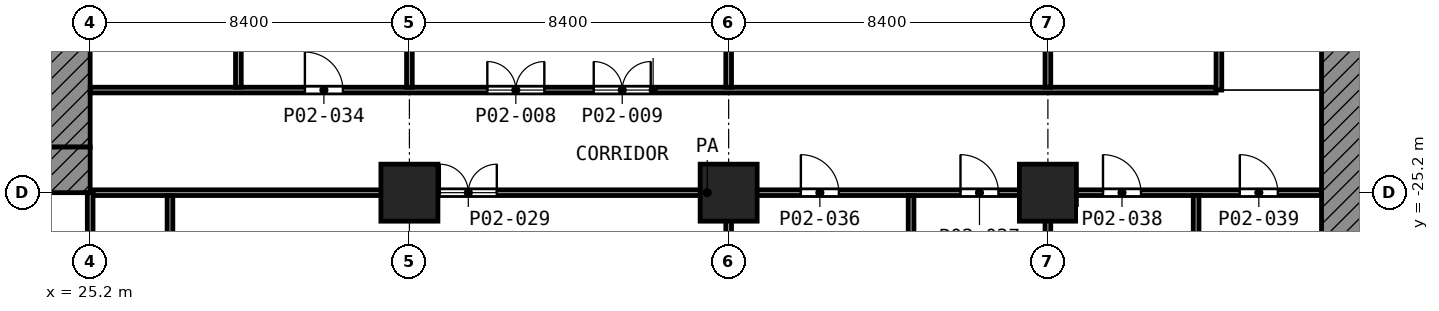
"""IFC4 building model, lengths in metres.
Left out: names, types, materials, properties, quantities, classifications, styles, units other than length and angle.
Written with IfcOpenShell. Run it as: python <this file> out.ifc"""

import sys

from ifc_helpers import new_model, si_unit, direction, frame, frame_2d, origin, origin_2d, place, context, subcontext, project, spatial, polyline, rectangle, outline, extrude, element, fill, save


model = new_model("IFC4")
c1 = context("Model", 3, precision=1e-05, world=origin(), true_north=direction((0.0, 1.0)))
c2 = subcontext(c1, "Body", "Model", "MODEL_VIEW")
j1 = project(units=[si_unit("LENGTHUNIT", "METRE"), si_unit("PLANEANGLEUNIT", "RADIAN")], contexts=[c1])
p1 = place(None, origin())
s1 = spatial("IfcSite", under=j1, at=p1, CompositionType="ELEMENT")
p2 = place(p1, origin())
s2 = spatial("IfcBuilding", under=s1, at=p2, CompositionType="ELEMENT")
p3 = place(p2, frame((0.0, 0.0, 7.0)))
s3 = spatial("IfcBuildingStorey", under=s2, at=p3, CompositionType="ELEMENT", Elevation=7.0)
for number, where, z_axis, x_axis in (
    (1, (33.6, -25.2, 0.0), (0.0, 0.0, 1.0), (1.0, 0.0, 0.0)),
    (2, (42.0, -25.2, 0.0), (0.0, 0.0, 1.0), (1.0, 0.0, 0.0)),
    (3, (50.4, -25.2, 0.0), (0.0, 0.0, 1.0), (1.0, 0.0, 0.0)),
):
    element("IfcColumn", number, at=place(p3, frame(where, z_axis=z_axis, x_axis=x_axis)), inside=s3, PredefinedType="COLUMN", context=c2, shape_type="SweptSolid", body=[
        extrude(rectangle(XDim=1.5, YDim=1.5, at=origin_2d()), origin(), (0.0, 0.0, 1.0), 5.6),
    ])
p4 = place(p3, frame((0.0, 0.0, -7.0), z_axis=(0.0, -1.0, 0.0), x_axis=(1.0, 0.0, 0.0)))
e4 = element("IfcWall", 4, at=p4, inside=s3, PredefinedType="SHEAR", context=c2, shape_type="SweptSolid", body=[
    extrude(outline(polyline([(60.448, 12.6), (60.159, 11.256), (60.0, 9.0), (60.0, 7.0), (57.6, 7.0), (57.6, 12.6), (60.448, 12.6)])), origin(), (0.0, 0.0, 1.0), 33.6),
])
p5 = place(p3, frame((24.6, -24.0, 0.0), z_axis=(0.0, 0.0, 1.0), x_axis=(0.0, 1.0, 0.0)))
e5 = element("IfcWall", 5, at=p5, inside=s3, PredefinedType="SHEAR", context=c2, shape_type="SweptSolid", body=[
    extrude(rectangle(XDim=18.6, YDim=1.2, at=frame_2d((9.3, 0.0))), origin(), (0.0, 0.0, 1.0), 5.25),
])
p6 = place(p5, frame((10.5, 0.0, 0.0)))
e6 = element("IfcOpeningElement", 6, at=p6, cuts=e5, PredefinedType="OPENING", context=c2, shape_type="SweptSolid", body=[
    extrude(rectangle(XDim=1.8, YDim=2.1, at=frame_2d((0.9, 1.05))), frame((0.0, 0.61, 0.0), z_axis=(0.0, -1.0, 0.0), x_axis=(1.0, 0.0, 0.0)), (0.0, 0.0, 1.0), 1.22),
])
p7 = place(p3, frame((24.6, -25.2, 0.0), z_axis=(0.0, 0.0, 1.0), x_axis=(0.0, 1.0, 0.0)))
e7 = element("IfcWall", 7, at=p7, inside=s3, PredefinedType="SHEAR", context=c2, shape_type="SweptSolid", body=[
    extrude(rectangle(XDim=1.2, YDim=1.2, at=frame_2d((0.6, 0.0))), origin(), (0.0, 0.0, 1.0), 5.25),
])
p8 = place(p3, frame((25.275, -25.2, 0.0), z_axis=(0.0, 0.0, 1.0), x_axis=(1.0, 0.0, 0.0)))
e8 = element("IfcWall", 8, at=p8, inside=s3, PredefinedType="PARTITIONING", context=c2, shape_type="SweptSolid", body=[
    extrude(rectangle(XDim=32.325, YDim=0.15, at=frame_2d((16.163, 0.0))), origin(), (0.0, 0.0, 1.0), 5.25),
])
p9 = place(p8, frame((18.625, 0.0, 0.0)))
e9 = element("IfcOpeningElement", 9, at=p9, cuts=e8, PredefinedType="OPENING", context=c2, shape_type="SweptSolid", body=[
    extrude(rectangle(XDim=1.0, YDim=2.1, at=frame_2d((0.5, 1.05))), frame((0.0, 0.085, 0.0), z_axis=(0.0, -1.0, 0.0), x_axis=(1.0, 0.0, 0.0)), (0.0, 0.0, 1.0), 0.17),
])
p10 = place(p8, frame((22.825, 0.0, 0.0)))
e10 = element("IfcOpeningElement", 10, at=p10, cuts=e8, PredefinedType="OPENING", context=c2, shape_type="SweptSolid", body=[
    extrude(rectangle(XDim=1.0, YDim=2.1, at=frame_2d((0.5, 1.05))), frame((0.0, 0.085, 0.0), z_axis=(0.0, -1.0, 0.0), x_axis=(1.0, 0.0, 0.0)), (0.0, 0.0, 1.0), 0.17),
])
p11 = place(p8, frame((26.575, 0.0, 0.0)))
e11 = element("IfcOpeningElement", 11, at=p11, cuts=e8, PredefinedType="OPENING", context=c2, shape_type="SweptSolid", body=[
    extrude(rectangle(XDim=1.0, YDim=2.1, at=frame_2d((0.5, 1.05))), frame((0.0, 0.085, 0.0), z_axis=(0.0, -1.0, 0.0), x_axis=(1.0, 0.0, 0.0)), (0.0, 0.0, 1.0), 0.17),
])
p12 = place(p8, frame((30.175, 0.0, 0.0)))
e12 = element("IfcOpeningElement", 12, at=p12, cuts=e8, PredefinedType="OPENING", context=c2, shape_type="SweptSolid", body=[
    extrude(rectangle(XDim=1.0, YDim=2.1, at=frame_2d((0.5, 1.05))), frame((0.0, 0.085, 0.0), z_axis=(0.0, -1.0, 0.0), x_axis=(1.0, 0.0, 0.0)), (0.0, 0.0, 1.0), 0.17),
])
p13 = place(p8, frame((9.125, 0.0, 0.0)))
e13 = element("IfcOpeningElement", 13, at=p13, cuts=e8, PredefinedType="OPENING", context=c2, shape_type="SweptSolid", body=[
    extrude(rectangle(XDim=1.5, YDim=2.1, at=frame_2d((0.75, 1.05))), frame((0.0, 0.085, 0.0), z_axis=(0.0, -1.0, 0.0), x_axis=(1.0, 0.0, 0.0)), (0.0, 0.0, 1.0), 0.17),
])
p14 = place(p3, frame((25.2, -22.5, 0.0), z_axis=(0.0, 0.0, 1.0), x_axis=(1.0, 0.0, 0.0)))
e14 = element("IfcWall", 14, at=p14, inside=s3, PredefinedType="PARTITIONING", context=c2, shape_type="SweptSolid", body=[
    extrude(rectangle(XDim=29.625, YDim=0.15, at=frame_2d((14.812, 0.0))), origin(), (0.0, 0.0, 1.0), 5.25),
])
p15 = place(p14, frame((5.65, 0.0, 0.0)))
e15 = element("IfcOpeningElement", 15, at=p15, cuts=e14, PredefinedType="OPENING", context=c2, shape_type="SweptSolid", body=[
    extrude(rectangle(XDim=1.0, YDim=2.1, at=frame_2d((0.5, 1.05))), frame((0.0, 0.085, 0.0), z_axis=(0.0, -1.0, 0.0), x_axis=(1.0, 0.0, 0.0)), (0.0, 0.0, 1.0), 0.17),
])
p16 = place(p14, frame((10.45, 0.0, 0.0)))
e16 = element("IfcOpeningElement", 16, at=p16, cuts=e14, PredefinedType="OPENING", context=c2, shape_type="SweptSolid", body=[
    extrude(rectangle(XDim=1.5, YDim=2.1, at=frame_2d((0.75, 1.05))), frame((0.0, 0.085, 0.0), z_axis=(0.0, -1.0, 0.0), x_axis=(1.0, 0.0, 0.0)), (0.0, 0.0, 1.0), 0.17),
])
p17 = place(p14, frame((13.25, 0.0, 0.0)))
e17 = element("IfcOpeningElement", 17, at=p17, cuts=e14, PredefinedType="OPENING", context=c2, shape_type="SweptSolid", body=[
    extrude(rectangle(XDim=1.5, YDim=2.1, at=frame_2d((0.75, 1.05))), frame((0.0, 0.085, 0.0), z_axis=(0.0, -1.0, 0.0), x_axis=(1.0, 0.0, 0.0)), (0.0, 0.0, 1.0), 0.17),
])
p18 = place(p3, frame((25.2, -32.85, 0.0), z_axis=(0.0, 0.0, 1.0), x_axis=(0.0, 1.0, 0.0)))
e18 = element("IfcWall", 18, at=p18, inside=s3, PredefinedType="PARTITIONING", context=c2, shape_type="SweptSolid", body=[
    extrude(rectangle(XDim=7.65, YDim=0.15, at=frame_2d((3.825, 0.0))), origin(), (0.0, 0.0, 1.0), 5.25),
])
p19 = place(p18, frame((3.375, 0.0, 0.0)))
e19 = element("IfcOpeningElement", 19, at=p19, cuts=e18, PredefinedType="OPENING", context=c2, shape_type="SweptSolid", body=[
    extrude(rectangle(XDim=0.9, YDim=2.1, at=frame_2d((0.45, 1.05))), frame((0.0, 0.085, 0.0), z_axis=(0.0, -1.0, 0.0), x_axis=(1.0, 0.0, 0.0)), (0.0, 0.0, 1.0), 0.17),
])
p20 = place(p3, frame((27.3, -39.525, 0.0), z_axis=(0.0, 0.0, 1.0), x_axis=(0.0, 1.0, 0.0)))
e20 = element("IfcWall", 20, at=p20, inside=s3, PredefinedType="PARTITIONING", context=c2, shape_type="SweptSolid", body=[
    extrude(rectangle(XDim=14.25, YDim=0.15, at=frame_2d((7.125, 0.0))), origin(), (0.0, 0.0, 1.0), 5.25),
])
p21 = place(p3, frame((29.1, -22.425, 0.0), z_axis=(0.0, 0.0, 1.0), x_axis=(0.0, 1.0, 0.0)))
e21 = element("IfcWall", 21, at=p21, inside=s3, PredefinedType="PARTITIONING", context=c2, shape_type="SweptSolid", body=[
    extrude(rectangle(XDim=8.25, YDim=0.15, at=frame_2d((4.125, 0.0))), origin(), (0.0, 0.0, 1.0), 5.25),
])
p22 = place(p3, frame((33.6, -22.425, 0.0), z_axis=(0.0, 0.0, 1.0), x_axis=(0.0, 1.0, 0.0)))
e22 = element("IfcWall", 22, at=p22, inside=s3, PredefinedType="PARTITIONING", context=c2, shape_type="SweptSolid", body=[
    extrude(rectangle(XDim=11.25, YDim=0.15, at=frame_2d((5.625, 0.0))), origin(), (0.0, 0.0, 1.0), 5.25),
])
p23 = place(p3, frame((42.0, -34.08, 0.0), z_axis=(0.0, 0.0, 1.0), x_axis=(0.0, 1.0, 0.0)))
e23 = element("IfcWall", 23, at=p23, inside=s3, PredefinedType="PARTITIONING", context=c2, shape_type="SweptSolid", body=[
    extrude(rectangle(XDim=8.805, YDim=0.15, at=frame_2d((4.403, 0.0))), origin(), (0.0, 0.0, 1.0), 3.85),
])
p24 = place(p3, frame((42.0, -22.425, 0.0), z_axis=(0.0, 0.0, 1.0), x_axis=(0.0, 1.0, 0.0)))
e24 = element("IfcWall", 24, at=p24, inside=s3, PredefinedType="PARTITIONING", context=c2, shape_type="SweptSolid", body=[
    extrude(rectangle(XDim=11.25, YDim=0.15, at=frame_2d((5.625, 0.0))), origin(), (0.0, 0.0, 1.0), 5.25),
])
p25 = place(p3, frame((46.8, -34.08, 0.0), z_axis=(0.0, 0.0, 1.0), x_axis=(0.0, 1.0, 0.0)))
e25 = element("IfcWall", 25, at=p25, inside=s3, PredefinedType="PARTITIONING", context=c2, shape_type="SweptSolid", body=[
    extrude(rectangle(XDim=8.805, YDim=0.15, at=frame_2d((4.403, 0.0))), origin(), (0.0, 0.0, 1.0), 3.85),
])
p26 = place(p3, frame((50.4, -34.08, 0.0), z_axis=(0.0, 0.0, 1.0), x_axis=(0.0, 1.0, 0.0)))
e26 = element("IfcWall", 26, at=p26, inside=s3, PredefinedType="PARTITIONING", context=c2, shape_type="SweptSolid", body=[
    extrude(rectangle(XDim=8.805, YDim=0.15, at=frame_2d((4.403, 0.0))), origin(), (0.0, 0.0, 1.0), 4.35),
])
p27 = place(p3, frame((50.4, -22.425, 0.0), z_axis=(0.0, 0.0, 1.0), x_axis=(0.0, 1.0, 0.0)))
e27 = element("IfcWall", 27, at=p27, inside=s3, PredefinedType="PARTITIONING", context=c2, shape_type="SweptSolid", body=[
    extrude(rectangle(XDim=11.25, YDim=0.15, at=frame_2d((5.625, 0.0))), origin(), (0.0, 0.0, 1.0), 5.25),
])
p28 = place(p3, frame((54.3, -34.08, 0.0), z_axis=(0.0, 0.0, 1.0), x_axis=(0.0, 1.0, 0.0)))
e28 = element("IfcWall", 28, at=p28, inside=s3, PredefinedType="PARTITIONING", context=c2, shape_type="SweptSolid", body=[
    extrude(rectangle(XDim=8.805, YDim=0.15, at=frame_2d((4.403, 0.0))), origin(), (0.0, 0.0, 1.0), 5.25),
])
p29 = place(p3, frame((54.9, -22.5, 0.0), z_axis=(0.0, 0.0, 1.0), x_axis=(0.0, 1.0, 0.0)))
e29 = element("IfcWall", 29, at=p29, inside=s3, PredefinedType="PARTITIONING", context=c2, shape_type="SweptSolid", body=[
    extrude(rectangle(XDim=11.4, YDim=0.15, at=frame_2d((5.7, 0.0))), origin(), (0.0, 0.0, 1.0), 5.25),
])
p30 = place(p29, frame((3.05, 0.0, 0.0)))
e30 = element("IfcOpeningElement", 30, at=p30, cuts=e29, PredefinedType="OPENING", context=c2, shape_type="SweptSolid", body=[
    extrude(rectangle(XDim=1.5, YDim=2.1, at=frame_2d((0.75, 1.05))), frame((0.0, 0.085, 0.0), z_axis=(0.0, -1.0, 0.0), x_axis=(1.0, 0.0, 0.0)), (0.0, 0.0, 1.0), 0.17),
])
p31 = place(p29, frame((6.85, 0.0, 0.0)))
e31 = element("IfcOpeningElement", 31, at=p31, cuts=e29, PredefinedType="OPENING", context=c2, shape_type="SweptSolid", body=[
    extrude(rectangle(XDim=1.5, YDim=2.1, at=frame_2d((0.75, 1.05))), frame((0.0, 0.085, 0.0), z_axis=(0.0, -1.0, 0.0), x_axis=(1.0, 0.0, 0.0)), (0.0, 0.0, 1.0), 0.17),
])
p32 = place(p15, origin())
e32 = element("IfcDoor", 32, at=p32, inside=s3, OperationType="SINGLE_SWING_LEFT", PredefinedType="DOOR", context=c2, shape_type="SweptSolid", body=[
    extrude(rectangle(XDim=1.0, YDim=2.1, at=frame_2d((0.5, 1.05))), frame((0.0, 0.025, 0.0), z_axis=(0.0, -1.0, 0.0), x_axis=(1.0, 0.0, 0.0)), (0.0, 0.0, 1.0), 0.05),
])
fill(e15, e32)
p33 = place(p16, origin())
e33 = element("IfcDoor", 33, at=p33, inside=s3, OperationType="DOUBLE_DOOR_SINGLE_SWING", PredefinedType="DOOR", context=c2, shape_type="SweptSolid", body=[
    extrude(rectangle(XDim=1.5, YDim=2.1, at=frame_2d((0.75, 1.05))), frame((0.0, 0.025, 0.0), z_axis=(0.0, -1.0, 0.0), x_axis=(1.0, 0.0, 0.0)), (0.0, 0.0, 1.0), 0.05),
])
fill(e16, e33)
p34 = place(p17, origin())
e34 = element("IfcDoor", 34, at=p34, inside=s3, OperationType="DOUBLE_DOOR_SINGLE_SWING", PredefinedType="DOOR", context=c2, shape_type="SweptSolid", body=[
    extrude(rectangle(XDim=1.5, YDim=2.1, at=frame_2d((0.75, 1.05))), frame((0.0, 0.025, 0.0), z_axis=(0.0, -1.0, 0.0), x_axis=(1.0, 0.0, 0.0)), (0.0, 0.0, 1.0), 0.05),
])
fill(e17, e34)
p35 = place(p9, origin())
e35 = element("IfcDoor", 35, at=p35, inside=s3, OperationType="SINGLE_SWING_LEFT", PredefinedType="DOOR", context=c2, shape_type="SweptSolid", body=[
    extrude(rectangle(XDim=1.0, YDim=2.1, at=frame_2d((0.5, 1.05))), frame((0.0, 0.025, 0.0), z_axis=(0.0, -1.0, 0.0), x_axis=(1.0, 0.0, 0.0)), (0.0, 0.0, 1.0), 0.05),
])
fill(e9, e35)
p36 = place(p10, origin())
e36 = element("IfcDoor", 36, at=p36, inside=s3, OperationType="SINGLE_SWING_LEFT", PredefinedType="DOOR", context=c2, shape_type="SweptSolid", body=[
    extrude(rectangle(XDim=1.0, YDim=2.1, at=frame_2d((0.5, 1.05))), frame((0.0, 0.025, 0.0), z_axis=(0.0, -1.0, 0.0), x_axis=(1.0, 0.0, 0.0)), (0.0, 0.0, 1.0), 0.05),
])
fill(e10, e36)
p37 = place(p11, origin())
e37 = element("IfcDoor", 37, at=p37, inside=s3, OperationType="SINGLE_SWING_LEFT", PredefinedType="DOOR", context=c2, shape_type="SweptSolid", body=[
    extrude(rectangle(XDim=1.0, YDim=2.1, at=frame_2d((0.5, 1.05))), frame((0.0, 0.025, 0.0), z_axis=(0.0, -1.0, 0.0), x_axis=(1.0, 0.0, 0.0)), (0.0, 0.0, 1.0), 0.05),
])
fill(e11, e37)
p38 = place(p12, origin())
e38 = element("IfcDoor", 38, at=p38, inside=s3, OperationType="SINGLE_SWING_LEFT", PredefinedType="DOOR", context=c2, shape_type="SweptSolid", body=[
    extrude(rectangle(XDim=1.0, YDim=2.1, at=frame_2d((0.5, 1.05))), frame((0.0, 0.025, 0.0), z_axis=(0.0, -1.0, 0.0), x_axis=(1.0, 0.0, 0.0)), (0.0, 0.0, 1.0), 0.05),
])
fill(e12, e38)
p39 = place(p13, origin())
e39 = element("IfcDoor", 39, at=p39, inside=s3, OperationType="DOUBLE_DOOR_SINGLE_SWING", PredefinedType="DOOR", context=c2, shape_type="SweptSolid", body=[
    extrude(rectangle(XDim=1.5, YDim=2.1, at=frame_2d((0.75, 1.05))), frame((0.0, 0.025, 0.0), z_axis=(0.0, -1.0, 0.0), x_axis=(1.0, 0.0, 0.0)), (0.0, 0.0, 1.0), 0.05),
])
fill(e13, e39)
save(model, sys.argv[1])
